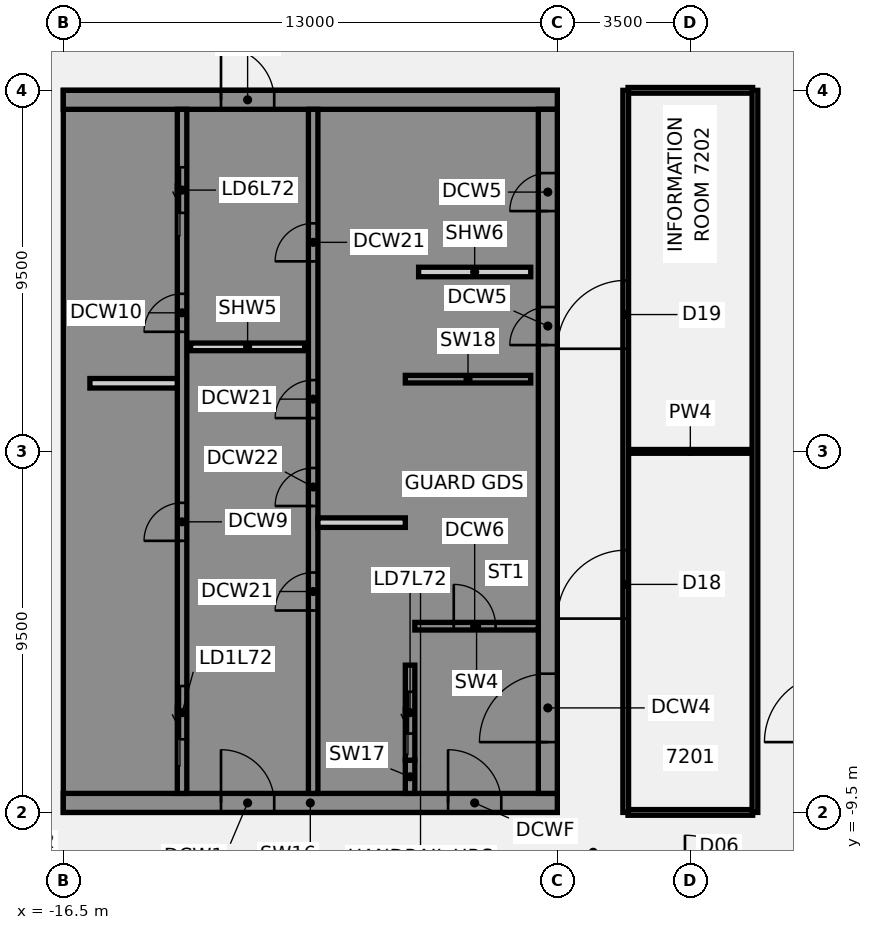
"""IFC4 building model, lengths in metres.
Left out: names, types, materials, properties, quantities, classifications, styles, units other than length and angle.
Written with IfcOpenShell. Run it as: python <this file> out.ifc"""

import sys

from ifc_helpers import new_model, si_unit, direction, frame, frame_2d, origin, place, context, subcontext, project, spatial, polyline, rectangle, outline, extrude, element, fill, save


model = new_model("IFC4")
c1 = context("Model", 3, precision=1e-05, world=origin(), true_north=direction((0.0, 1.0)))
c2 = subcontext(c1, "Body", "Model", "MODEL_VIEW")
j1 = project(units=[si_unit("LENGTHUNIT", "METRE"), si_unit("PLANEANGLEUNIT", "RADIAN")], contexts=[c1])
p1 = place(None, origin())
s1 = spatial("IfcSite", under=j1, at=p1, CompositionType="ELEMENT")
p2 = place(p1, origin())
s2 = spatial("IfcBuilding", under=s1, at=p2, CompositionType="ELEMENT")
p3 = place(p2, frame((0.0, 0.0, 287.4)))
s3 = spatial("IfcBuildingStorey", under=s2, at=p3, CompositionType="ELEMENT", Elevation=287.4)
p4 = place(p3, frame((-1.64, -9.5, 0.0), z_axis=(0.0, 0.0, 1.0), x_axis=(1.0, 0.0, 0.0)))
e1 = element("IfcWall", 1, at=p4, inside=s3, PredefinedType="PARTITIONING", context=c2, shape_type="SweptSolid", body=[
    extrude(rectangle(XDim=3.28, YDim=0.15, at=frame_2d((1.64, 0.0))), origin(), (0.0, 0.0, 1.0), 6.1),
])
p5 = place(p3, frame((-1.64, 0.0, 0.0), z_axis=(0.0, 0.0, 1.0), x_axis=(1.0, 0.0, 0.0)))
e2 = element("IfcWall", 2, at=p5, inside=s3, PredefinedType="PARTITIONING", context=c2, shape_type="SweptSolid", body=[
    extrude(rectangle(XDim=3.28, YDim=0.1, at=frame_2d((1.64, 0.0))), origin(), (0.0, 0.0, 1.0), 6.1),
])
p6 = place(p3, frame((-1.64, 9.5, 0.0), z_axis=(0.0, 0.0, 1.0), x_axis=(1.0, 0.0, 0.0)))
e3 = element("IfcWall", 3, at=p6, inside=s3, PredefinedType="PARTITIONING", context=c2, shape_type="SweptSolid", body=[
    extrude(rectangle(XDim=3.28, YDim=0.15, at=frame_2d((1.64, 0.0))), origin(), (0.0, 0.0, 1.0), 6.1),
])
p7 = place(p3, frame((-1.7, -9.5, 0.0), z_axis=(0.0, 0.0, 1.0), x_axis=(0.0, 1.0, 0.0)))
e4 = element("IfcWall", 4, at=p7, inside=s3, PredefinedType="PARTITIONING", context=c2, shape_type="SweptSolid", body=[
    extrude(rectangle(XDim=19.0, YDim=0.15, at=frame_2d((9.5, 0.0))), origin(), (0.0, 0.0, 1.0), 6.1),
])
p8 = place(p7, frame((5.1, 0.0, 0.0)))
e5 = element("IfcOpeningElement", 5, at=p8, cuts=e4, PredefinedType="OPENING", context=c2, shape_type="SweptSolid", body=[
    extrude(rectangle(XDim=1.8, YDim=2.1, at=frame_2d((0.9, 1.05))), frame((0.0, 0.085, 0.0), z_axis=(0.0, -1.0, 0.0), x_axis=(1.0, 0.0, 0.0)), (0.0, 0.0, 1.0), 0.17),
])
p9 = place(p7, frame((12.2, 0.0, 0.0)))
e6 = element("IfcOpeningElement", 6, at=p9, cuts=e4, PredefinedType="OPENING", context=c2, shape_type="SweptSolid", body=[
    extrude(rectangle(XDim=1.8, YDim=2.1, at=frame_2d((0.9, 1.05))), frame((0.0, 0.085, 0.0), z_axis=(0.0, -1.0, 0.0), x_axis=(1.0, 0.0, 0.0)), (0.0, 0.0, 1.0), 0.17),
])
p10 = place(p3, frame((1.7, -9.5, 0.0), z_axis=(0.0, 0.0, 1.0), x_axis=(0.0, 1.0, 0.0)))
e7 = element("IfcWall", 7, at=p10, inside=s3, PredefinedType="PARTITIONING", context=c2, shape_type="SweptSolid", body=[
    extrude(rectangle(XDim=19.0, YDim=0.15, at=frame_2d((9.5, 0.0))), origin(), (0.0, 0.0, 1.0), 6.1),
])
p11 = place(p3, frame((-16.5, -9.25, 0.0), z_axis=(0.0, 0.0, 1.0), x_axis=(1.0, 0.0, 0.0)))
e8 = element("IfcWall", 8, at=p11, inside=s3, PredefinedType="SHEAR", context=c2, shape_type="SweptSolid", body=[
    extrude(rectangle(XDim=13.0, YDim=0.5, at=frame_2d((6.5, 0.0))), origin(), (0.0, 0.0, 1.0), 6.8),
])
p12 = place(p11, frame((4.15, 0.0, 0.0)))
e9 = element("IfcOpeningElement", 9, at=p12, cuts=e8, PredefinedType="OPENING", context=c2, shape_type="SweptSolid", body=[
    extrude(rectangle(XDim=1.4, YDim=2.1, at=frame_2d((0.7, 1.05))), frame((0.0, 0.26, 0.0), z_axis=(0.0, -1.0, 0.0), x_axis=(1.0, 0.0, 0.0)), (0.0, 0.0, 1.0), 0.52),
])
p13 = place(p11, frame((10.125, 0.0, 0.0)))
e10 = element("IfcOpeningElement", 10, at=p13, cuts=e8, PredefinedType="OPENING", context=c2, shape_type="SweptSolid", body=[
    extrude(rectangle(XDim=1.4, YDim=2.1, at=frame_2d((0.7, 1.05))), frame((0.0, 0.26, 0.0), z_axis=(0.0, -1.0, 0.0), x_axis=(1.0, 0.0, 0.0)), (0.0, 0.0, 1.0), 0.52),
])
p14 = place(p3, frame((-16.5, 9.25, 0.0), z_axis=(0.0, 0.0, 1.0), x_axis=(1.0, 0.0, 0.0)))
e11 = element("IfcWall", 11, at=p14, inside=s3, PredefinedType="SHEAR", context=c2, shape_type="SweptSolid", body=[
    extrude(rectangle(XDim=13.0, YDim=0.5, at=frame_2d((6.5, 0.0))), origin(), (0.0, 0.0, 1.0), 6.8),
])
p15 = place(p14, frame((4.15, 0.0, 0.0)))
e12 = element("IfcOpeningElement", 12, at=p15, cuts=e11, PredefinedType="OPENING", context=c2, shape_type="SweptSolid", body=[
    extrude(rectangle(XDim=1.4, YDim=2.1, at=frame_2d((0.7, 1.05))), frame((0.0, 0.26, 0.0), z_axis=(0.0, -1.0, 0.0), x_axis=(1.0, 0.0, 0.0)), (0.0, 0.0, 1.0), 0.52),
])
p16 = place(p3, frame((-13.15, 2.75, 0.0), z_axis=(0.0, 0.0, 1.0), x_axis=(1.0, 0.0, 0.0)))
e13 = element("IfcWall", 13, at=p16, inside=s3, PredefinedType="PARTITIONING", context=c2, shape_type="SweptSolid", body=[
    extrude(rectangle(XDim=3.0, YDim=0.2, at=frame_2d((1.5, 0.0))), origin(), (0.0, 0.0, 1.0), 6.8),
])
p17 = place(p3, origin())
e14 = element("IfcWall", 14, at=p17, inside=s3, PredefinedType="SHEAR", context=c2, shape_type="SweptSolid", body=[
    extrude(outline(polyline([(-13.5, -8.125), (-16.0, -8.125), (-16.0, -5.625), (-13.5, -5.625), (-13.5, -5.375), (-16.0, -5.375), (-16.0, 5.375), (-13.5, 5.375), (-13.5, 5.625), (-16.0, 5.625), (-16.0, 8.125), (-13.5, 8.125), (-13.5, 9.0), (-16.0, 9.0), (-16.5, 9.0), (-16.5, -9.0), (-16.0, -9.0), (-13.5, -9.0), (-13.5, -8.125)])), origin(), (0.0, 0.0, 1.0), 6.8),
])
p18 = place(p3, origin())
e15 = element("IfcWall", 15, at=p18, inside=s3, PredefinedType="SHEAR", context=c2, shape_type="SweptSolid", body=[
    extrude(outline(polyline([(-9.8, -5.625), (-7.5, -5.625), (-7.25, -5.625), (-7.25, 9.0), (-7.5, 9.0), (-9.8, 9.0), (-9.8, 8.125), (-7.5, 8.125), (-7.5, -5.375), (-9.8, -5.375), (-9.8, -5.625)])), origin(), (0.0, 0.0, 1.0), 6.8),
])
p19 = place(p3, origin())
e16 = element("IfcWall", 16, at=p19, inside=s3, PredefinedType="SHEAR", context=c2, shape_type="SweptSolid", body=[
    extrude(outline(polyline([(-7.5, -8.125), (-9.55, -8.125), (-9.55, -5.625), (-9.8, -5.625), (-9.8, -8.125), (-9.8, -9.0), (-7.5, -9.0), (-7.5, -8.125)])), origin(), (0.0, 0.0, 1.0), 6.8),
])
p20 = place(p3, frame((-7.375, -9.0, 0.0), z_axis=(0.0, 0.0, 1.0), x_axis=(0.0, 1.0, 0.0)))
e17 = element("IfcWall", 17, at=p20, inside=s3, PredefinedType="SHEAR", context=c2, shape_type="SweptSolid", body=[
    extrude(rectangle(XDim=0.875, YDim=0.25, at=frame_2d((0.438, 0.0))), origin(), (0.0, 0.0, 1.0), 6.8),
])
p21 = place(p3, frame((-7.5, 1.9, 0.0), z_axis=(0.0, 0.0, 1.0), x_axis=(1.0, 0.0, 0.0)))
e18 = element("IfcWall", 18, at=p21, inside=s3, PredefinedType="SHEAR", context=c2, shape_type="SweptSolid", body=[
    extrude(rectangle(XDim=3.3, YDim=0.2, at=frame_2d((1.65, 0.0))), origin(), (0.0, 0.0, 1.0), 6.8),
])
p22 = place(p3, frame((-13.375, -9.0, 0.0), z_axis=(0.0, 0.0, 1.0), x_axis=(0.0, 1.0, 0.0)))
e19 = element("IfcWall", 19, at=p22, inside=s3, PredefinedType="SHEAR", context=c2, shape_type="SweptSolid", body=[
    extrude(rectangle(XDim=18.0, YDim=0.25, at=frame_2d((9.0, 0.0))), origin(), (0.0, 0.0, 1.0), 6.8),
])
p23 = place(p22, frame((1.425, 0.0, 0.0)))
e20 = element("IfcOpeningElement", 20, at=p23, cuts=e19, PredefinedType="OPENING", context=c2, shape_type="SweptSolid", body=[
    extrude(rectangle(XDim=1.4, YDim=2.1, at=frame_2d((0.7, 1.05))), frame((0.0, 0.135, 0.0), z_axis=(0.0, -1.0, 0.0), x_axis=(1.0, 0.0, 0.0)), (0.0, 0.0, 1.0), 0.27),
])
p24 = place(p22, frame((15.275, 0.0, 0.0)))
e21 = element("IfcOpeningElement", 21, at=p24, cuts=e19, PredefinedType="OPENING", context=c2, shape_type="SweptSolid", body=[
    extrude(rectangle(XDim=1.2, YDim=2.1, at=frame_2d((0.6, 1.05))), frame((0.0, 0.135, 0.0), z_axis=(0.0, -1.0, 0.0), x_axis=(1.0, 0.0, 0.0)), (0.0, 0.0, 1.0), 0.27),
])
p25 = place(p22, frame((6.646, 0.0, 0.0)))
e22 = element("IfcOpeningElement", 22, at=p25, cuts=e19, PredefinedType="OPENING", context=c2, shape_type="SweptSolid", body=[
    extrude(rectangle(XDim=1.0, YDim=2.1, at=frame_2d((0.5, 1.05))), frame((0.0, 0.135, 0.0), z_axis=(0.0, -1.0, 0.0), x_axis=(1.0, 0.0, 0.0)), (0.0, 0.0, 1.0), 0.27),
])
p26 = place(p22, frame((12.146, 0.0, 0.0)))
e23 = element("IfcOpeningElement", 23, at=p26, cuts=e19, PredefinedType="OPENING", context=c2, shape_type="SweptSolid", body=[
    extrude(rectangle(XDim=1.0, YDim=2.1, at=frame_2d((0.5, 1.05))), frame((0.0, 0.135, 0.0), z_axis=(0.0, -1.0, 0.0), x_axis=(1.0, 0.0, 0.0)), (0.0, 0.0, 1.0), 0.27),
])
p27 = place(p3, frame((-9.925, -9.0, 0.0), z_axis=(0.0, 0.0, 1.0), x_axis=(0.0, 1.0, 0.0)))
e24 = element("IfcWall", 24, at=p27, inside=s3, PredefinedType="SHEAR", context=c2, shape_type="SweptSolid", body=[
    extrude(rectangle(XDim=18.0, YDim=0.25, at=frame_2d((9.0, 0.0))), origin(), (0.0, 0.0, 1.0), 6.8),
])
p28 = place(p27, frame((4.812, 0.0, 0.0)))
e25 = element("IfcOpeningElement", 25, at=p28, cuts=e24, PredefinedType="OPENING", context=c2, shape_type="SweptSolid", body=[
    extrude(rectangle(XDim=1.0, YDim=2.1, at=frame_2d((0.5, 1.05))), frame((0.0, 0.135, 0.0), z_axis=(0.0, -1.0, 0.0), x_axis=(1.0, 0.0, 0.0)), (0.0, 0.0, 1.0), 0.27),
])
p29 = place(p27, frame((7.562, 0.0, 0.0)))
e26 = element("IfcOpeningElement", 26, at=p29, cuts=e24, PredefinedType="OPENING", context=c2, shape_type="SweptSolid", body=[
    extrude(rectangle(XDim=1.0, YDim=2.1, at=frame_2d((0.5, 1.05))), frame((0.0, 0.135, 0.0), z_axis=(0.0, -1.0, 0.0), x_axis=(1.0, 0.0, 0.0)), (0.0, 0.0, 1.0), 0.27),
])
p30 = place(p27, frame((9.875, 0.0, 0.0)))
e27 = element("IfcOpeningElement", 27, at=p30, cuts=e24, PredefinedType="OPENING", context=c2, shape_type="SweptSolid", body=[
    extrude(rectangle(XDim=1.0, YDim=2.1, at=frame_2d((0.5, 1.05))), frame((0.0, 0.135, 0.0), z_axis=(0.0, -1.0, 0.0), x_axis=(1.0, 0.0, 0.0)), (0.0, 0.0, 1.0), 0.27),
])
p31 = place(p27, frame((14.0, 0.0, 0.0)))
e28 = element("IfcOpeningElement", 28, at=p31, cuts=e24, PredefinedType="OPENING", context=c2, shape_type="SweptSolid", body=[
    extrude(rectangle(XDim=1.0, YDim=2.1, at=frame_2d((0.5, 1.05))), frame((0.0, 0.135, 0.0), z_axis=(0.0, -1.0, 0.0), x_axis=(1.0, 0.0, 0.0)), (0.0, 0.0, 1.0), 0.27),
])
p32 = place(p3, frame((-7.375, -8.125, 0.0), z_axis=(0.0, 0.0, 1.0), x_axis=(0.0, 1.0, 0.0)))
e29 = element("IfcWall", 29, at=p32, inside=s3, PredefinedType="SHEAR", context=c2, shape_type="SweptSolid", body=[
    extrude(rectangle(XDim=2.5, YDim=0.25, at=frame_2d((1.25, 0.0))), origin(), (0.0, 0.0, 1.0), 6.8),
])
p33 = place(p32, frame((0.7, 0.0, 0.0)))
e30 = element("IfcOpeningElement", 30, at=p33, cuts=e29, PredefinedType="OPENING", context=c2, shape_type="SweptSolid", body=[
    extrude(rectangle(XDim=1.1, YDim=2.1, at=frame_2d((0.55, 1.05))), frame((0.0, 0.135, 0.0), z_axis=(0.0, -1.0, 0.0), x_axis=(1.0, 0.0, 0.0)), (0.0, 0.0, 1.0), 0.27),
])
p34 = place(p3, frame((-3.75, -9.0, 0.0), z_axis=(0.0, 0.0, 1.0), x_axis=(0.0, 1.0, 0.0)))
e31 = element("IfcWall", 31, at=p34, inside=s3, PredefinedType="SHEAR", context=c2, shape_type="SweptSolid", body=[
    extrude(rectangle(XDim=18.0, YDim=0.5, at=frame_2d((9.0, 0.0))), origin(), (0.0, 0.0, 1.0), 6.8),
])
p35 = place(p34, frame((1.35, 0.0, 0.0)))
e32 = element("IfcOpeningElement", 32, at=p35, cuts=e31, PredefinedType="OPENING", context=c2, shape_type="SweptSolid", body=[
    extrude(rectangle(XDim=1.8, YDim=2.1, at=frame_2d((0.9, 1.05))), frame((0.0, 0.26, 0.0), z_axis=(0.0, -1.0, 0.0), x_axis=(1.0, 0.0, 0.0)), (0.0, 0.0, 1.0), 0.52),
])
p36 = place(p34, frame((11.798, 0.0, 0.0)))
e33 = element("IfcOpeningElement", 33, at=p36, cuts=e31, PredefinedType="OPENING", context=c2, shape_type="SweptSolid", body=[
    extrude(rectangle(XDim=1.0, YDim=2.1, at=frame_2d((0.5, 1.05))), frame((0.0, 0.26, 0.0), z_axis=(0.0, -1.0, 0.0), x_axis=(1.0, 0.0, 0.0)), (0.0, 0.0, 1.0), 0.52),
])
p37 = place(p34, frame((15.323, 0.0, 0.0)))
e34 = element("IfcOpeningElement", 34, at=p37, cuts=e31, PredefinedType="OPENING", context=c2, shape_type="SweptSolid", body=[
    extrude(rectangle(XDim=1.0, YDim=2.1, at=frame_2d((0.5, 1.05))), frame((0.0, 0.26, 0.0), z_axis=(0.0, -1.0, 0.0), x_axis=(1.0, 0.0, 0.0)), (0.0, 0.0, 1.0), 0.52),
])
p38 = place(p3, frame((-7.15, 4.72, 0.0), z_axis=(0.0, 0.0, 1.0), x_axis=(1.0, 0.0, 0.0)))
e35 = element("IfcWall", 35, at=p38, inside=s3, PredefinedType="PARTITIONING", context=c2, shape_type="SweptSolid", body=[
    extrude(rectangle(XDim=2.95, YDim=0.25, at=frame_2d((1.475, 0.0))), origin(), (0.0, 0.0, 1.0), 6.8),
])
p39 = place(p3, frame((-7.25, -4.6, 0.0), z_axis=(0.0, 0.0, 1.0), x_axis=(1.0, 0.0, 0.0)))
e36 = element("IfcWall", 36, at=p39, inside=s3, PredefinedType="SHEAR", context=c2, shape_type="SweptSolid", body=[
    extrude(rectangle(XDim=3.25, YDim=0.2, at=frame_2d((1.625, 0.0))), origin(), (0.0, 0.0, 1.0), 6.8),
])
p40 = place(p39, frame((1.025, 0.0, 0.0)))
e37 = element("IfcOpeningElement", 37, at=p40, cuts=e36, PredefinedType="OPENING", context=c2, shape_type="SweptSolid", body=[
    extrude(rectangle(XDim=1.1, YDim=2.1, at=frame_2d((0.55, 1.05))), frame((0.0, 0.11, 0.0), z_axis=(0.0, -1.0, 0.0), x_axis=(1.0, 0.0, 0.0)), (0.0, 0.0, 1.0), 0.22),
])
for number, where, z_axis, x_axis in (
    (38, (-15.8, 1.792, 0.0), (0.0, 0.0, 1.0), (1.0, 0.0, 0.0)),
    (39, (-9.8, -1.875, 0.0), (0.0, 0.0, 1.0), (1.0, 0.0, 0.0)),
):
    element("IfcWall", number, at=place(p3, frame(where, z_axis=z_axis, x_axis=x_axis)), inside=s3, PredefinedType="PARTITIONING", context=c2, shape_type="SweptSolid", body=[
        extrude(rectangle(XDim=2.3, YDim=0.25, at=frame_2d((1.15, 0.0))), origin(), (0.0, 0.0, 1.0), 6.8),
    ])
p41 = place(p8, frame((1.8, 0.0, 0.0), z_axis=(0.0, 0.0, 1.0), x_axis=(-1.0, 0.0, 0.0)))
e40 = element("IfcDoor", 40, at=p41, inside=s3, OperationType="DOUBLE_DOOR_SINGLE_SWING", PredefinedType="DOOR", context=c2, shape_type="SweptSolid", body=[
    extrude(rectangle(XDim=1.8, YDim=2.1, at=frame_2d((0.9, 1.05))), frame((0.0, 0.025, 0.0), z_axis=(0.0, -1.0, 0.0), x_axis=(1.0, 0.0, 0.0)), (0.0, 0.0, 1.0), 0.05),
])
fill(e5, e40)
p42 = place(p9, frame((1.8, 0.0, 0.0), z_axis=(0.0, 0.0, 1.0), x_axis=(-1.0, 0.0, 0.0)))
e41 = element("IfcDoor", 41, at=p42, inside=s3, OperationType="DOUBLE_DOOR_SINGLE_SWING", PredefinedType="DOOR", context=c2, shape_type="SweptSolid", body=[
    extrude(rectangle(XDim=1.8, YDim=2.1, at=frame_2d((0.9, 1.05))), frame((0.0, 0.025, 0.0), z_axis=(0.0, -1.0, 0.0), x_axis=(1.0, 0.0, 0.0)), (0.0, 0.0, 1.0), 0.05),
])
fill(e6, e41)
p43 = place(p12, origin())
e42 = element("IfcDoor", 42, at=p43, inside=s3, OperationType="SINGLE_SWING_LEFT", PredefinedType="DOOR", context=c2, shape_type="SweptSolid", body=[
    extrude(rectangle(XDim=1.4, YDim=2.1, at=frame_2d((0.7, 1.05))), frame((0.0, 0.025, 0.0), z_axis=(0.0, -1.0, 0.0), x_axis=(1.0, 0.0, 0.0)), (0.0, 0.0, 1.0), 0.05),
])
fill(e9, e42)
p44 = place(p13, origin())
e43 = element("IfcDoor", 43, at=p44, inside=s3, OperationType="SINGLE_SWING_LEFT", PredefinedType="DOOR", context=c2, shape_type="SweptSolid", body=[
    extrude(rectangle(XDim=1.4, YDim=2.1, at=frame_2d((0.7, 1.05))), frame((0.0, 0.025, 0.0), z_axis=(0.0, -1.0, 0.0), x_axis=(1.0, 0.0, 0.0)), (0.0, 0.0, 1.0), 0.05),
])
fill(e10, e43)
p45 = place(p15, origin())
e44 = element("IfcDoor", 44, at=p45, inside=s3, OperationType="SINGLE_SWING_LEFT", PredefinedType="DOOR", context=c2, shape_type="SweptSolid", body=[
    extrude(rectangle(XDim=1.4, YDim=2.1, at=frame_2d((0.7, 1.05))), frame((0.0, 0.025, 0.0), z_axis=(0.0, -1.0, 0.0), x_axis=(1.0, 0.0, 0.0)), (0.0, 0.0, 1.0), 0.05),
])
fill(e12, e44)
p46 = place(p35, origin())
e45 = element("IfcDoor", 45, at=p46, inside=s3, OperationType="SINGLE_SWING_LEFT", PredefinedType="DOOR", context=c2, shape_type="SweptSolid", body=[
    extrude(rectangle(XDim=1.8, YDim=2.1, at=frame_2d((0.9, 1.05))), frame((0.0, 0.025, 0.0), z_axis=(0.0, -1.0, 0.0), x_axis=(1.0, 0.0, 0.0)), (0.0, 0.0, 1.0), 0.05),
])
fill(e32, e45)
p47 = place(p36, origin())
e46 = element("IfcDoor", 46, at=p47, inside=s3, OperationType="SINGLE_SWING_LEFT", PredefinedType="DOOR", context=c2, shape_type="SweptSolid", body=[
    extrude(rectangle(XDim=1.0, YDim=2.1, at=frame_2d((0.5, 1.05))), frame((0.0, 0.225, 0.0), z_axis=(0.0, -1.0, 0.0), x_axis=(1.0, 0.0, 0.0)), (0.0, 0.0, 1.0), 0.05),
])
fill(e33, e46)
p48 = place(p37, origin())
e47 = element("IfcDoor", 47, at=p48, inside=s3, OperationType="SINGLE_SWING_LEFT", PredefinedType="DOOR", context=c2, shape_type="SweptSolid", body=[
    extrude(rectangle(XDim=1.0, YDim=2.1, at=frame_2d((0.5, 1.05))), frame((0.0, 0.225, 0.0), z_axis=(0.0, -1.0, 0.0), x_axis=(1.0, 0.0, 0.0)), (0.0, 0.0, 1.0), 0.05),
])
fill(e34, e47)
p49 = place(p40, origin())
e48 = element("IfcDoor", 48, at=p49, inside=s3, OperationType="SINGLE_SWING_LEFT", PredefinedType="DOOR", context=c2, shape_type="SweptSolid", body=[
    extrude(rectangle(XDim=1.1, YDim=2.1, at=frame_2d((0.55, 1.05))), frame((0.0, 0.025, 0.0), z_axis=(0.0, -1.0, 0.0), x_axis=(1.0, 0.0, 0.0)), (0.0, 0.0, 1.0), 0.05),
])
fill(e37, e48)
p50 = place(p23, origin())
e49 = element("IfcDoor", 49, at=p50, inside=s3, OperationType="SLIDING_TO_LEFT", PredefinedType="DOOR", context=c2, shape_type="SweptSolid", body=[
    extrude(rectangle(XDim=1.4, YDim=2.1, at=frame_2d((0.7, 1.05))), frame((0.0, 0.025, 0.0), z_axis=(0.0, -1.0, 0.0), x_axis=(1.0, 0.0, 0.0)), (0.0, 0.0, 1.0), 0.05),
])
fill(e20, e49)
p51 = place(p24, origin())
e50 = element("IfcDoor", 50, at=p51, inside=s3, OperationType="SLIDING_TO_LEFT", PredefinedType="DOOR", context=c2, shape_type="SweptSolid", body=[
    extrude(rectangle(XDim=1.2, YDim=2.1, at=frame_2d((0.6, 1.05))), frame((0.0, 0.025, 0.0), z_axis=(0.0, -1.0, 0.0), x_axis=(1.0, 0.0, 0.0)), (0.0, 0.0, 1.0), 0.05),
])
fill(e21, e50)
p52 = place(p33, origin())
e51 = element("IfcDoor", 51, at=p52, inside=s3, OperationType="SLIDING_TO_LEFT", PredefinedType="DOOR", context=c2, shape_type="SweptSolid", body=[
    extrude(rectangle(XDim=1.1, YDim=2.1, at=frame_2d((0.55, 1.05))), frame((0.0, 0.025, 0.0), z_axis=(0.0, -1.0, 0.0), x_axis=(1.0, 0.0, 0.0)), (0.0, 0.0, 1.0), 0.05),
])
fill(e30, e51)
p53 = place(p25, origin())
e52 = element("IfcDoor", 52, at=p53, inside=s3, OperationType="SINGLE_SWING_LEFT", PredefinedType="DOOR", context=c2, shape_type="SweptSolid", body=[
    extrude(rectangle(XDim=1.0, YDim=2.1, at=frame_2d((0.5, 1.05))), frame((0.0, 0.025, 0.0), z_axis=(0.0, -1.0, 0.0), x_axis=(1.0, 0.0, 0.0)), (0.0, 0.0, 1.0), 0.05),
])
fill(e22, e52)
p54 = place(p26, origin())
e53 = element("IfcDoor", 53, at=p54, inside=s3, OperationType="SINGLE_SWING_LEFT", PredefinedType="DOOR", context=c2, shape_type="SweptSolid", body=[
    extrude(rectangle(XDim=1.0, YDim=2.1, at=frame_2d((0.5, 1.05))), frame((0.0, 0.025, 0.0), z_axis=(0.0, -1.0, 0.0), x_axis=(1.0, 0.0, 0.0)), (0.0, 0.0, 1.0), 0.05),
])
fill(e23, e53)
p55 = place(p28, origin())
e54 = element("IfcDoor", 54, at=p55, inside=s3, OperationType="SINGLE_SWING_LEFT", PredefinedType="DOOR", context=c2, shape_type="SweptSolid", body=[
    extrude(rectangle(XDim=1.0, YDim=2.1, at=frame_2d((0.5, 1.05))), frame((0.0, 0.025, 0.0), z_axis=(0.0, -1.0, 0.0), x_axis=(1.0, 0.0, 0.0)), (0.0, 0.0, 1.0), 0.05),
])
fill(e25, e54)
p56 = place(p29, origin())
e55 = element("IfcDoor", 55, at=p56, inside=s3, OperationType="SINGLE_SWING_LEFT", PredefinedType="DOOR", context=c2, shape_type="SweptSolid", body=[
    extrude(rectangle(XDim=1.0, YDim=2.1, at=frame_2d((0.5, 1.05))), frame((0.0, 0.025, 0.0), z_axis=(0.0, -1.0, 0.0), x_axis=(1.0, 0.0, 0.0)), (0.0, 0.0, 1.0), 0.05),
])
fill(e26, e55)
p57 = place(p30, origin())
e56 = element("IfcDoor", 56, at=p57, inside=s3, OperationType="SINGLE_SWING_LEFT", PredefinedType="DOOR", context=c2, shape_type="SweptSolid", body=[
    extrude(rectangle(XDim=1.0, YDim=2.1, at=frame_2d((0.5, 1.05))), frame((0.0, 0.025, 0.0), z_axis=(0.0, -1.0, 0.0), x_axis=(1.0, 0.0, 0.0)), (0.0, 0.0, 1.0), 0.05),
])
fill(e27, e56)
p58 = place(p31, origin())
e57 = element("IfcDoor", 57, at=p58, inside=s3, OperationType="SINGLE_SWING_LEFT", PredefinedType="DOOR", context=c2, shape_type="SweptSolid", body=[
    extrude(rectangle(XDim=1.0, YDim=2.1, at=frame_2d((0.5, 1.05))), frame((0.0, 0.025, 0.0), z_axis=(0.0, -1.0, 0.0), x_axis=(1.0, 0.0, 0.0)), (0.0, 0.0, 1.0), 0.05),
])
fill(e28, e57)
save(model, sys.argv[1])
